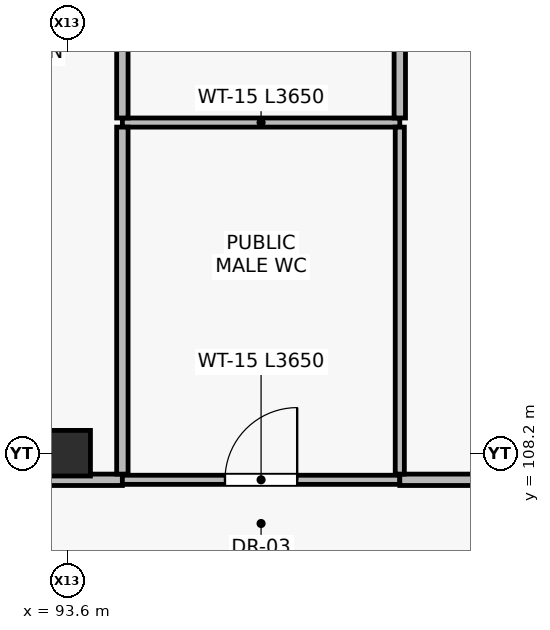
"""IFC4 building model, lengths in metres.
Left out: names, types, materials, properties, quantities, classifications, styles, units other than length and angle.
Written with IfcOpenShell. Run it as: python <this file> out.ifc"""

import sys

from ifc_helpers import new_model, si_unit, direction, frame, frame_2d, origin, origin_2d, place, context, subcontext, project, spatial, rectangle, extrude, element, fill, save


model = new_model("IFC4")
c1 = context("Model", 3, precision=1e-05, world=origin(), true_north=direction((0.0, 1.0)))
c2 = subcontext(c1, "Body", "Model", "MODEL_VIEW")
j1 = project(units=[si_unit("LENGTHUNIT", "METRE"), si_unit("PLANEANGLEUNIT", "RADIAN")], contexts=[c1])
p1 = place(None, origin())
s1 = spatial("IfcSite", under=j1, at=p1, CompositionType="ELEMENT")
p2 = place(p1, origin())
s2 = spatial("IfcBuilding", under=s1, at=p2, CompositionType="ELEMENT")
p3 = place(p2, frame((0.0, 0.0, 4.8)))
s3 = spatial("IfcBuildingStorey", under=s2, at=p3, CompositionType="ELEMENT", Elevation=4.8)
p4 = place(p3, frame((93.6, 108.2, 0.0), z_axis=(0.0, 0.0, 1.0), x_axis=(1.0, 0.0, 0.0)))
e1 = element("IfcColumn", 1, at=p4, inside=s3, PredefinedType="COLUMN", context=c2, shape_type="SweptSolid", body=[
    extrude(rectangle(XDim=0.6, YDim=0.6, at=origin_2d()), origin(), (0.0, 0.0, 1.0), 4.8),
])
p5 = place(p3, frame((89.37, 107.85, 0.0), z_axis=(0.0, 0.0, 1.0), x_axis=(1.0, 0.0, 0.0)))
e2 = element("IfcWall", 2, at=p5, inside=s3, PredefinedType="PARTITIONING", context=c2, shape_type="SweptSolid", body=[
    extrude(rectangle(XDim=4.95, YDim=0.15, at=frame_2d((2.475, 0.0))), origin(), (0.0, 0.0, 1.0), 4.04),
])
p6 = place(p5, frame((1.975, 0.0, 0.0)))
e3 = element("IfcOpeningElement", 3, at=p6, cuts=e2, PredefinedType="OPENING", context=c2, shape_type="SweptSolid", body=[
    extrude(rectangle(XDim=1.0, YDim=2.1, at=frame_2d((0.5, 1.05))), frame((0.0, 0.085, 0.0), z_axis=(0.0, -1.0, 0.0), x_axis=(1.0, 0.0, 0.0)), (0.0, 0.0, 1.0), 0.17),
])
p7 = place(p3, frame((94.32, 107.85, 0.0), z_axis=(0.0, 0.0, 1.0), x_axis=(1.0, 0.0, 0.0)))
e4 = element("IfcWall", 4, at=p7, inside=s3, PredefinedType="PARTITIONING", context=c2, shape_type="SweptSolid", body=[
    extrude(rectangle(XDim=3.65, YDim=0.12, at=frame_2d((1.825, 0.0))), origin(), (0.0, 0.0, 1.0), 4.04),
])
p8 = place(p7, frame((1.35, 0.0, 0.0)))
e5 = element("IfcOpeningElement", 5, at=p8, cuts=e4, PredefinedType="OPENING", context=c2, shape_type="SweptSolid", body=[
    extrude(rectangle(XDim=0.95, YDim=2.1, at=frame_2d((0.475, 1.05))), frame((0.0, 0.07, 0.0), z_axis=(0.0, -1.0, 0.0), x_axis=(1.0, 0.0, 0.0)), (0.0, 0.0, 1.0), 0.14),
])
p9 = place(p3, frame((94.32, 112.55, 0.0), z_axis=(0.0, 0.0, 1.0), x_axis=(1.0, 0.0, 0.0)))
e6 = element("IfcWall", 6, at=p9, inside=s3, PredefinedType="PARTITIONING", context=c2, shape_type="SweptSolid", body=[
    extrude(rectangle(XDim=3.65, YDim=0.12, at=frame_2d((1.825, 0.0))), origin(), (0.0, 0.0, 1.0), 4.54),
])
p10 = place(p3, frame((97.97, 107.85, 0.0), z_axis=(0.0, 0.0, 1.0), x_axis=(1.0, 0.0, 0.0)))
e7 = element("IfcWall", 7, at=p10, inside=s3, PredefinedType="PARTITIONING", context=c2, shape_type="SweptSolid", body=[
    extrude(rectangle(XDim=5.85, YDim=0.15, at=frame_2d((2.925, 0.0))), origin(), (0.0, 0.0, 1.0), 4.04),
])
p11 = place(p10, frame((1.498, 0.0, 0.0)))
e8 = element("IfcOpeningElement", 8, at=p11, cuts=e7, PredefinedType="OPENING", context=c2, shape_type="SweptSolid", body=[
    extrude(rectangle(XDim=1.1, YDim=2.15, at=frame_2d((0.55, 1.075))), frame((0.0, 0.085, 0.0), z_axis=(0.0, -1.0, 0.0), x_axis=(1.0, 0.0, 0.0)), (0.0, 0.0, 1.0), 0.17),
])
p12 = place(p3, frame((94.32, 107.925, 0.0), z_axis=(0.0, 0.0, 1.0), x_axis=(0.0, 1.0, 0.0)))
e9 = element("IfcWall", 9, at=p12, inside=s3, PredefinedType="PARTITIONING", context=c2, shape_type="SweptSolid", body=[
    extrude(rectangle(XDim=4.565, YDim=0.15, at=frame_2d((2.282, 0.0))), origin(), (0.0, 0.0, 1.0), 4.54),
])
p13 = place(p3, frame((94.32, 112.61, 0.0), z_axis=(0.0, 0.0, 1.0), x_axis=(0.0, 1.0, 0.0)))
e10 = element("IfcWall", 10, at=p13, inside=s3, PredefinedType="PARTITIONING", context=c2, shape_type="SweptSolid", body=[
    extrude(rectangle(XDim=3.22, YDim=0.15, at=frame_2d((1.61, 0.0))), origin(), (0.0, 0.0, 1.0), 4.54),
])
p14 = place(p3, frame((97.97, 107.925, 0.0), z_axis=(0.0, 0.0, 1.0), x_axis=(0.0, 1.0, 0.0)))
e11 = element("IfcWall", 11, at=p14, inside=s3, PredefinedType="PARTITIONING", context=c2, shape_type="SweptSolid", body=[
    extrude(rectangle(XDim=4.565, YDim=0.12, at=frame_2d((2.282, 0.0))), origin(), (0.0, 0.0, 1.0), 4.54),
])
p15 = place(p3, frame((97.97, 112.61, 0.0), z_axis=(0.0, 0.0, 1.0), x_axis=(0.0, 1.0, 0.0)))
e12 = element("IfcWall", 12, at=p15, inside=s3, PredefinedType="PARTITIONING", context=c2, shape_type="SweptSolid", body=[
    extrude(rectangle(XDim=3.22, YDim=0.15, at=frame_2d((1.61, 0.0))), origin(), (0.0, 0.0, 1.0), 4.54),
])
p16 = place(p8, origin())
e13 = element("IfcDoor", 13, at=p16, inside=s3, OperationType="SINGLE_SWING_RIGHT", PredefinedType="DOOR", context=c2, shape_type="SweptSolid", body=[
    extrude(rectangle(XDim=0.95, YDim=2.1, at=frame_2d((0.475, 1.05))), frame((0.0, 0.025, 0.0), z_axis=(0.0, -1.0, 0.0), x_axis=(1.0, 0.0, 0.0)), (0.0, 0.0, 1.0), 0.05),
])
fill(e5, e13)
save(model, sys.argv[1])
